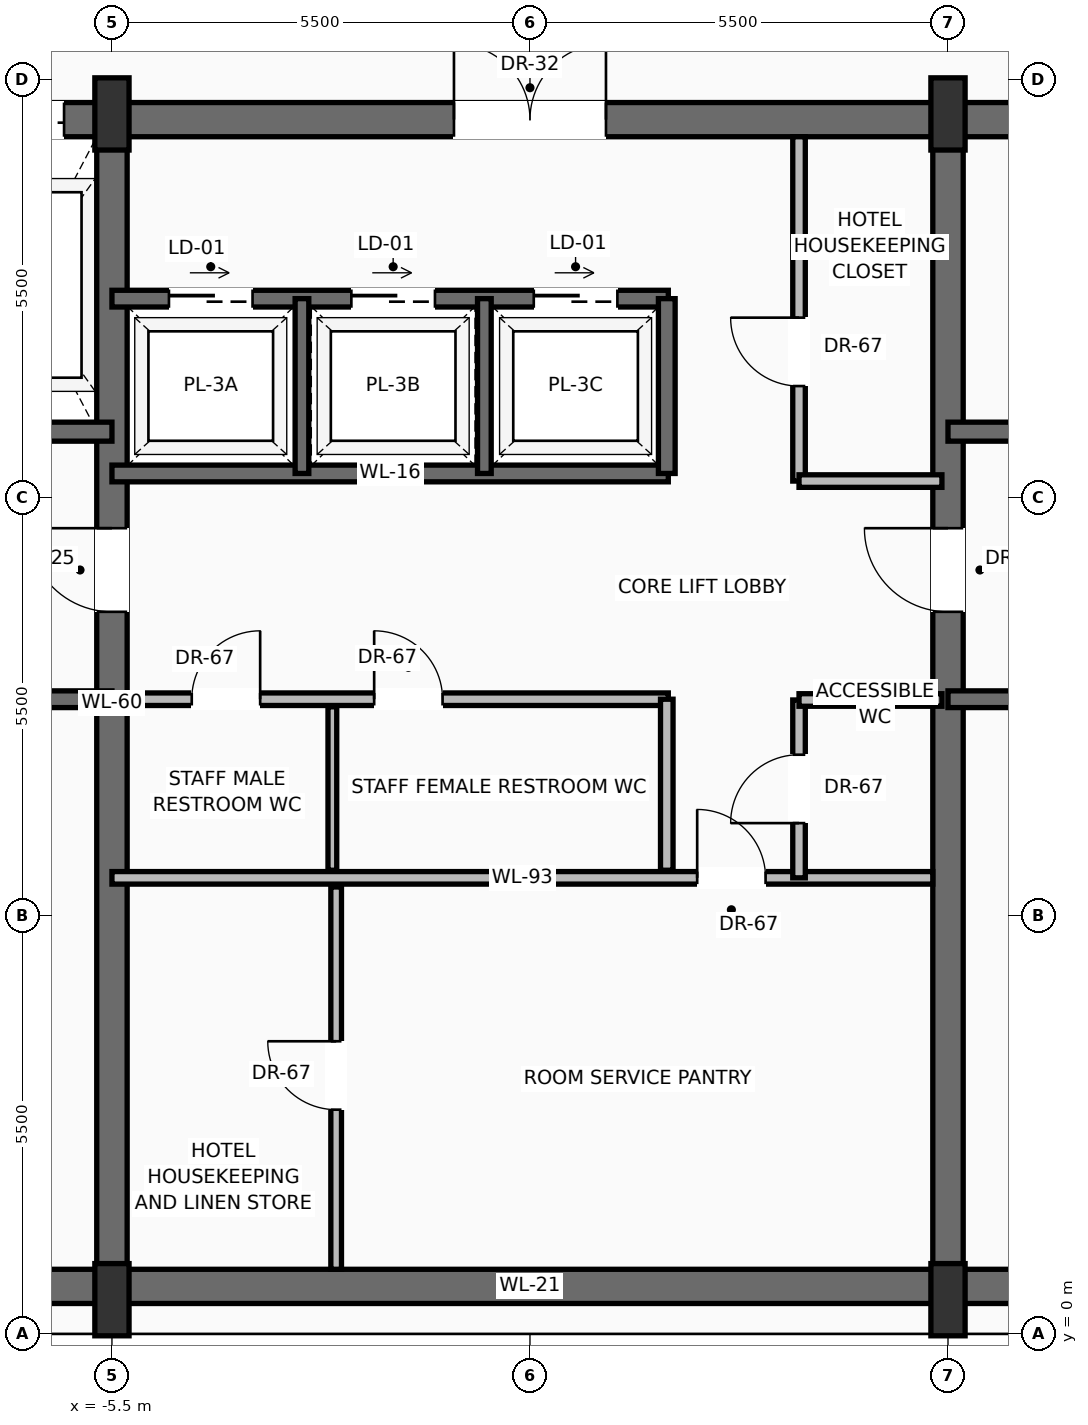
"""IFC4 building model, lengths in metres.
Left out: names, types, materials, properties, quantities, classifications, styles, units other than length and angle.
Written with IfcOpenShell. Run it as: python <this file> out.ifc"""

import sys

from ifc_helpers import new_model, si_unit, direction, frame, frame_2d, origin, origin_2d, place, context, subcontext, project, spatial, rectangle, extrude, source, transform, mapped, element, fill, save


model = new_model("IFC4")
c1 = context("Model", 3, precision=1e-05, world=origin(), true_north=direction((0.0, 1.0)))
c2 = subcontext(c1, "Body", "Model", "MODEL_VIEW")
j1 = project(units=[si_unit("LENGTHUNIT", "METRE"), si_unit("PLANEANGLEUNIT", "RADIAN")], contexts=[c1])
p1 = place(None, origin())
s1 = spatial("IfcSite", under=j1, at=p1, CompositionType="ELEMENT")
p2 = place(p1, origin())
s2 = spatial("IfcBuilding", under=s1, at=p2, CompositionType="ELEMENT")
p3 = place(p2, frame((0.0, 0.0, 276.45)))
s3 = spatial("IfcBuildingStorey", under=s2, at=p3, CompositionType="ELEMENT", Elevation=276.45)
p4 = place(p3, frame((-10.65, 0.625, 0.0), z_axis=(0.0, 0.0, 1.0), x_axis=(1.0, 0.0, 0.0)))
e1 = element("IfcWall", 1, at=p4, inside=s3, PredefinedType="SHEAR", context=c2, shape_type="SweptSolid", body=[
    extrude(rectangle(XDim=21.3, YDim=0.45, at=frame_2d((10.65, 0.0))), origin(), (0.0, 0.0, 1.0), 3.24),
])
p5 = place(p3, frame((-10.6, 15.975, 0.0), z_axis=(0.0, 0.0, 1.0), x_axis=(1.0, 0.0, 0.0)))
e2 = element("IfcWall", 2, at=p5, inside=s3, PredefinedType="SHEAR", context=c2, shape_type="SweptSolid", body=[
    extrude(rectangle(XDim=21.2, YDim=0.45, at=frame_2d((10.6, 0.0))), origin(), (0.0, 0.0, 1.0), 3.24),
])
p6 = place(p5, frame((3.17, 0.0, 0.0)))
e3 = element("IfcOpeningElement", 3, at=p6, cuts=e2, PredefinedType="OPENING", context=c2, shape_type="SweptSolid", body=[
    extrude(rectangle(XDim=1.3, YDim=2.3, at=frame_2d((0.65, 1.15))), frame((0.0, 0.235, 0.0), z_axis=(0.0, -1.0, 0.0), x_axis=(1.0, 0.0, 0.0)), (0.0, 0.0, 1.0), 0.47),
])
p7 = place(p5, frame((9.6, 0.0, 0.0)))
e4 = element("IfcOpeningElement", 4, at=p7, cuts=e2, PredefinedType="OPENING", context=c2, shape_type="SweptSolid", body=[
    extrude(rectangle(XDim=2.0, YDim=2.4, at=frame_2d((1.0, 1.2))), frame((0.0, 0.235, 0.0), z_axis=(0.0, -1.0, 0.0), x_axis=(1.0, 0.0, 0.0)), (0.0, 0.0, 1.0), 0.47),
])
p8 = place(p3, frame((-5.5, 0.625, 0.0), z_axis=(0.0, 0.0, 1.0), x_axis=(0.0, 1.0, 0.0)))
e5 = element("IfcWall", 5, at=p8, inside=s3, PredefinedType="SHEAR", context=c2, shape_type="SweptSolid", body=[
    extrude(rectangle(XDim=15.35, YDim=0.4, at=frame_2d((7.675, 0.0))), origin(), (0.0, 0.0, 1.0), 3.24),
])
p9 = place(p8, frame((8.875, 0.0, 0.0)))
e6 = element("IfcOpeningElement", 6, at=p9, cuts=e5, PredefinedType="OPENING", context=c2, shape_type="SweptSolid", body=[
    extrude(rectangle(XDim=1.1, YDim=2.2, at=frame_2d((0.55, 1.1))), frame((0.0, 0.21, 0.0), z_axis=(0.0, -1.0, 0.0), x_axis=(1.0, 0.0, 0.0)), (0.0, 0.0, 1.0), 0.42),
])
p10 = place(p3, frame((5.5, 0.625, 0.0), z_axis=(0.0, 0.0, 1.0), x_axis=(0.0, 1.0, 0.0)))
e7 = element("IfcWall", 7, at=p10, inside=s3, PredefinedType="SHEAR", context=c2, shape_type="SweptSolid", body=[
    extrude(rectangle(XDim=15.35, YDim=0.4, at=frame_2d((7.675, 0.0))), origin(), (0.0, 0.0, 1.0), 3.24),
])
p11 = place(p10, frame((8.875, 0.0, 0.0)))
e8 = element("IfcOpeningElement", 8, at=p11, cuts=e7, PredefinedType="OPENING", context=c2, shape_type="SweptSolid", body=[
    extrude(rectangle(XDim=1.1, YDim=2.2, at=frame_2d((0.55, 1.1))), frame((0.0, 0.21, 0.0), z_axis=(0.0, -1.0, 0.0), x_axis=(1.0, 0.0, 0.0)), (0.0, 0.0, 1.0), 0.42),
])
m1 = source(origin(), c2, "Body", "SweptSolid", [
    extrude(rectangle(XDim=0.45, YDim=0.95, at=origin_2d()), origin(), (0.0, 0.0, 1.0), 3.45),
])
for number, where, z_axis, x_axis in (
    (9, (-5.5, 0.45, 0.0), (0.0, 0.0, 1.0), (1.0, 0.0, 0.0)),
    (10, (5.5, 0.45, 0.0), (0.0, 0.0, 1.0), (1.0, 0.0, 0.0)),
    (11, (-5.5, 16.05, 0.0), (0.0, 0.0, 1.0), (1.0, 0.0, 0.0)),
    (12, (5.5, 16.05, 0.0), (0.0, 0.0, 1.0), (1.0, 0.0, 0.0)),
):
    element("IfcColumn", number, at=place(p3, frame(where, z_axis=z_axis, x_axis=x_axis)), inside=s3, PredefinedType="PILASTER", context=c2, shape_type="MappedRepresentation", body=[
        mapped(m1, transform((0.0, 0.0, 0.0), scale=1.0)),
    ])
p12 = place(p3, frame((-5.5, 8.35, 0.0), z_axis=(0.0, 0.0, 1.0), x_axis=(-1.0, 0.0, 0.0)))
e13 = element("IfcWall", 13, at=p12, inside=s3, PredefinedType="SOLIDWALL", context=c2, shape_type="SweptSolid", body=[
    extrude(rectangle(XDim=4.65, YDim=0.22, at=frame_2d((2.325, 0.0))), origin(), (0.0, 0.0, 1.0), 3.24),
])
p13 = place(p12, frame((2.5, 0.0, 0.0)))
e14 = element("IfcOpeningElement", 14, at=p13, cuts=e13, PredefinedType="OPENING", context=c2, shape_type="SweptSolid", body=[
    extrude(rectangle(XDim=1.15, YDim=2.2, at=frame_2d((0.575, 1.1))), frame((0.0, 0.12, 0.0), z_axis=(0.0, -1.0, 0.0), x_axis=(1.0, 0.0, 0.0)), (0.0, 0.0, 1.0), 0.24),
])
p14 = place(p3, frame((-5.5, 11.87, 0.0), z_axis=(0.0, 0.0, 1.0), x_axis=(-1.0, 0.0, 0.0)))
e15 = element("IfcWall", 15, at=p14, inside=s3, PredefinedType="SOLIDWALL", context=c2, shape_type="SweptSolid", body=[
    extrude(rectangle(XDim=4.65, YDim=0.25, at=frame_2d((2.325, 0.0))), origin(), (0.0, 0.0, 1.0), 3.24),
])
p15 = place(p14, frame((2.95, 0.0, 0.0)))
e16 = element("IfcOpeningElement", 16, at=p15, cuts=e15, PredefinedType="OPENING", context=c2, shape_type="SweptSolid", body=[
    extrude(rectangle(XDim=1.2, YDim=2.25, at=frame_2d((0.6, 1.125))), frame((0.0, 0.135, 0.0), z_axis=(0.0, -1.0, 0.0), x_axis=(1.0, 0.0, 0.0)), (0.0, 0.0, 1.0), 0.27),
])
p16 = place(p3, frame((10.15, 8.35, 0.0), z_axis=(0.0, 0.0, 1.0), x_axis=(-1.0, 0.0, 0.0)))
e17 = element("IfcWall", 17, at=p16, inside=s3, PredefinedType="SOLIDWALL", context=c2, shape_type="SweptSolid", body=[
    extrude(rectangle(XDim=4.65, YDim=0.22, at=frame_2d((2.325, 0.0))), origin(), (0.0, 0.0, 1.0), 3.24),
])
p17 = place(p16, frame((1.0, 0.0, 0.0)))
e18 = element("IfcOpeningElement", 18, at=p17, cuts=e17, PredefinedType="OPENING", context=c2, shape_type="SweptSolid", body=[
    extrude(rectangle(XDim=1.15, YDim=2.2, at=frame_2d((0.575, 1.1))), frame((0.0, 0.12, 0.0), z_axis=(0.0, -1.0, 0.0), x_axis=(1.0, 0.0, 0.0)), (0.0, 0.0, 1.0), 0.24),
])
p18 = place(p3, frame((10.15, 11.87, 0.0), z_axis=(0.0, 0.0, 1.0), x_axis=(-1.0, 0.0, 0.0)))
e19 = element("IfcWall", 19, at=p18, inside=s3, PredefinedType="SOLIDWALL", context=c2, shape_type="SweptSolid", body=[
    extrude(rectangle(XDim=4.65, YDim=0.25, at=frame_2d((2.325, 0.0))), origin(), (0.0, 0.0, 1.0), 3.24),
])
p19 = place(p18, frame((0.5, 0.0, 0.0)))
e20 = element("IfcOpeningElement", 20, at=p19, cuts=e19, PredefinedType="OPENING", context=c2, shape_type="SweptSolid", body=[
    extrude(rectangle(XDim=1.2, YDim=2.25, at=frame_2d((0.6, 1.125))), frame((0.0, 0.135, 0.0), z_axis=(0.0, -1.0, 0.0), x_axis=(1.0, 0.0, 0.0)), (0.0, 0.0, 1.0), 0.27),
])
p20 = place(p3, frame((-5.5, 6.0, 0.0), z_axis=(0.0, 0.0, 1.0), x_axis=(1.0, 0.0, 0.0)))
e21 = element("IfcWall", 21, at=p20, inside=s3, PredefinedType="PARTITIONING", context=c2, shape_type="SweptSolid", body=[
    extrude(rectangle(XDim=10.8, YDim=0.165, at=frame_2d((5.4, 0.0))), origin(), (0.0, 0.0, 1.0), 3.232),
])
p21 = place(p20, frame((7.7, 0.0, 0.0)))
e22 = element("IfcOpeningElement", 22, at=p21, cuts=e21, PredefinedType="OPENING", context=c2, shape_type="SweptSolid", body=[
    extrude(rectangle(XDim=0.9, YDim=2.1, at=frame_2d((0.45, 1.05))), frame((0.0, 0.093, 0.0), z_axis=(0.0, -1.0, 0.0), x_axis=(1.0, 0.0, 0.0)), (0.0, 0.0, 1.0), 0.185),
])
p22 = place(p3, frame((-2.55, 0.85, 0.0), z_axis=(0.0, 0.0, 1.0), x_axis=(0.0, 1.0, 0.0)))
e23 = element("IfcWall", 23, at=p22, inside=s3, PredefinedType="PARTITIONING", context=c2, shape_type="SweptSolid", body=[
    extrude(rectangle(XDim=5.03, YDim=0.14, at=frame_2d((2.515, 0.0))), origin(), (0.0, 0.0, 1.0), 3.232),
])
p23 = place(p22, frame((2.1, 0.0, 0.0)))
e24 = element("IfcOpeningElement", 24, at=p23, cuts=e23, PredefinedType="OPENING", context=c2, shape_type="SweptSolid", body=[
    extrude(rectangle(XDim=0.9, YDim=2.1, at=frame_2d((0.45, 1.05))), frame((0.0, 0.08, 0.0), z_axis=(0.0, -1.0, 0.0), x_axis=(1.0, 0.0, 0.0)), (0.0, 0.0, 1.0), 0.16),
])
p24 = place(p3, frame((3.54, 6.0, 0.0), z_axis=(0.0, 0.0, 1.0), x_axis=(0.0, 1.0, 0.0)))
e25 = element("IfcWall", 25, at=p24, inside=s3, PredefinedType="PARTITIONING", context=c2, shape_type="SweptSolid", body=[
    extrude(rectangle(XDim=2.34, YDim=0.165, at=frame_2d((1.17, 0.0))), origin(), (0.0, 0.0, 1.0), 3.232),
])
p25 = place(p24, frame((0.72, 0.0, 0.0)))
e26 = element("IfcOpeningElement", 26, at=p25, cuts=e25, PredefinedType="OPENING", context=c2, shape_type="SweptSolid", body=[
    extrude(rectangle(XDim=0.9, YDim=2.1, at=frame_2d((0.45, 1.05))), frame((0.0, 0.093, 0.0), z_axis=(0.0, -1.0, 0.0), x_axis=(1.0, 0.0, 0.0)), (0.0, 0.0, 1.0), 0.185),
])
p26 = place(p3, frame((3.54, 8.34, 0.0), z_axis=(0.0, 0.0, 1.0), x_axis=(1.0, 0.0, 0.0)))
e27 = element("IfcWall", 27, at=p26, inside=s3, PredefinedType="PARTITIONING", context=c2, shape_type="SweptSolid", body=[
    extrude(rectangle(XDim=1.88, YDim=0.165, at=frame_2d((0.94, 0.0))), origin(), (0.0, 0.0, 1.0), 3.232),
])
p27 = place(p3, frame((-5.3, 8.35, 0.0), z_axis=(0.0, 0.0, 1.0), x_axis=(1.0, 0.0, 0.0)))
e28 = element("IfcWall", 28, at=p27, inside=s3, PredefinedType="PARTITIONING", context=c2, shape_type="SweptSolid", body=[
    extrude(rectangle(XDim=7.12, YDim=0.165, at=frame_2d((3.56, 0.0))), origin(), (0.0, 0.0, 1.0), 3.232),
])
p28 = place(p27, frame((0.85, 0.0, 0.0)))
e29 = element("IfcOpeningElement", 29, at=p28, cuts=e28, PredefinedType="OPENING", context=c2, shape_type="SweptSolid", body=[
    extrude(rectangle(XDim=0.9, YDim=2.1, at=frame_2d((0.45, 1.05))), frame((0.0, 0.093, 0.0), z_axis=(0.0, -1.0, 0.0), x_axis=(1.0, 0.0, 0.0)), (0.0, 0.0, 1.0), 0.185),
])
p29 = place(p27, frame((3.25, 0.0, 0.0)))
e30 = element("IfcOpeningElement", 30, at=p29, cuts=e28, PredefinedType="OPENING", context=c2, shape_type="SweptSolid", body=[
    extrude(rectangle(XDim=0.9, YDim=2.1, at=frame_2d((0.45, 1.05))), frame((0.0, 0.093, 0.0), z_axis=(0.0, -1.0, 0.0), x_axis=(1.0, 0.0, 0.0)), (0.0, 0.0, 1.0), 0.185),
])
p30 = place(p3, frame((1.8, 6.1, 0.0), z_axis=(0.0, 0.0, 1.0), x_axis=(0.0, 1.0, 0.0)))
e31 = element("IfcWall", 31, at=p30, inside=s3, PredefinedType="PARTITIONING", context=c2, shape_type="SweptSolid", body=[
    extrude(rectangle(XDim=2.25, YDim=0.165, at=frame_2d((1.125, 0.0))), origin(), (0.0, 0.0, 1.0), 3.232),
])
p31 = place(p3, frame((-2.6, 6.1, 0.0), z_axis=(0.0, 0.0, 1.0), x_axis=(0.0, 1.0, 0.0)))
e32 = element("IfcWall", 32, at=p31, inside=s3, PredefinedType="PARTITIONING", context=c2, shape_type="SweptSolid", body=[
    extrude(rectangle(XDim=2.15, YDim=0.115, at=frame_2d((1.075, 0.0))), origin(), (0.0, 0.0, 1.0), 3.232),
])
p32 = place(p3, frame((-5.5, 11.32, 0.0), z_axis=(0.0, 0.0, 1.0), x_axis=(1.0, 0.0, 0.0)))
e33 = element("IfcWall", 33, at=p32, inside=s3, PredefinedType="SOLIDWALL", context=c2, shape_type="SweptSolid", body=[
    extrude(rectangle(XDim=7.32, YDim=0.22, at=frame_2d((3.66, 0.0))), origin(), (0.0, 0.0, 1.0), 3.24),
])
p33 = place(p3, frame((-5.5, 13.62, 0.0), z_axis=(0.0, 0.0, 1.0), x_axis=(1.0, 0.0, 0.0)))
e34 = element("IfcWall", 34, at=p33, inside=s3, PredefinedType="SOLIDWALL", context=c2, shape_type="SweptSolid", body=[
    extrude(rectangle(XDim=7.32, YDim=0.22, at=frame_2d((3.66, 0.0))), origin(), (0.0, 0.0, 1.0), 3.24),
])
p34 = place(p33, frame((0.75, 0.0, 0.0)))
e35 = element("IfcOpeningElement", 35, at=p34, cuts=e34, PredefinedType="OPENING", context=c2, shape_type="SweptSolid", body=[
    extrude(rectangle(XDim=1.1, YDim=2.2, at=frame_2d((0.55, 1.1))), frame((0.0, 0.12, 0.0), z_axis=(0.0, -1.0, 0.0), x_axis=(1.0, 0.0, 0.0)), (0.0, 0.0, 1.0), 0.24),
])
p35 = place(p33, frame((3.15, 0.0, 0.0)))
e36 = element("IfcOpeningElement", 36, at=p35, cuts=e34, PredefinedType="OPENING", context=c2, shape_type="SweptSolid", body=[
    extrude(rectangle(XDim=1.1, YDim=2.2, at=frame_2d((0.55, 1.1))), frame((0.0, 0.12, 0.0), z_axis=(0.0, -1.0, 0.0), x_axis=(1.0, 0.0, 0.0)), (0.0, 0.0, 1.0), 0.24),
])
p36 = place(p33, frame((5.55, 0.0, 0.0)))
e37 = element("IfcOpeningElement", 37, at=p36, cuts=e34, PredefinedType="OPENING", context=c2, shape_type="SweptSolid", body=[
    extrude(rectangle(XDim=1.1, YDim=2.2, at=frame_2d((0.55, 1.1))), frame((0.0, 0.12, 0.0), z_axis=(0.0, -1.0, 0.0), x_axis=(1.0, 0.0, 0.0)), (0.0, 0.0, 1.0), 0.24),
])
p37 = place(p3, frame((1.8, 11.32, 0.0), z_axis=(0.0, 0.0, 1.0), x_axis=(0.0, 1.0, 0.0)))
e38 = element("IfcWall", 38, at=p37, inside=s3, PredefinedType="SOLIDWALL", context=c2, shape_type="SweptSolid", body=[
    extrude(rectangle(XDim=2.3, YDim=0.22, at=frame_2d((1.15, 0.0))), origin(), (0.0, 0.0, 1.0), 3.24),
])
for number, where, z_axis, x_axis in (
    (39, (-3.0, 11.32, 0.0), (0.0, 0.0, 1.0), (0.0, 1.0, 0.0)),
    (40, (-0.6, 11.32, 0.0), (0.0, 0.0, 1.0), (0.0, 1.0, 0.0)),
):
    element("IfcWall", number, at=place(p3, frame(where, z_axis=z_axis, x_axis=x_axis)), inside=s3, PredefinedType="SOLIDWALL", context=c2, shape_type="SweptSolid", body=[
        extrude(rectangle(XDim=2.3, YDim=0.18, at=frame_2d((1.15, 0.0))), origin(), (0.0, 0.0, 1.0), 3.24),
    ])
p38 = place(p3, frame((3.54, 11.22, 0.0), z_axis=(0.0, 0.0, 1.0), x_axis=(0.0, 1.0, 0.0)))
e41 = element("IfcWall", 41, at=p38, inside=s3, PredefinedType="PARTITIONING", context=c2, shape_type="SweptSolid", body=[
    extrude(rectangle(XDim=4.53, YDim=0.165, at=frame_2d((2.265, 0.0))), origin(), (0.0, 0.0, 1.0), 3.232),
])
p39 = place(p38, frame((1.25, 0.0, 0.0)))
e42 = element("IfcOpeningElement", 42, at=p39, cuts=e41, PredefinedType="OPENING", context=c2, shape_type="SweptSolid", body=[
    extrude(rectangle(XDim=0.9, YDim=2.1, at=frame_2d((0.45, 1.05))), frame((0.0, 0.093, 0.0), z_axis=(0.0, -1.0, 0.0), x_axis=(1.0, 0.0, 0.0)), (0.0, 0.0, 1.0), 0.185),
])
p40 = place(p3, frame((3.54, 11.22, 0.0), z_axis=(0.0, 0.0, 1.0), x_axis=(1.0, 0.0, 0.0)))
e43 = element("IfcWall", 43, at=p40, inside=s3, PredefinedType="PARTITIONING", context=c2, shape_type="SweptSolid", body=[
    extrude(rectangle(XDim=1.88, YDim=0.165, at=frame_2d((0.94, 0.0))), origin(), (0.0, 0.0, 1.0), 3.232),
])
m2 = source(origin(), c2, "Body", "SweptSolid", [
    extrude(rectangle(XDim=1.1, YDim=2.2, at=frame_2d((0.55, 1.1))), frame((0.0, 0.025, 0.0), z_axis=(0.0, -1.0, 0.0), x_axis=(1.0, 0.0, 0.0)), (0.0, 0.0, 1.0), 0.05),
])
p41 = place(p9, origin())
e44 = element("IfcDoor", 44, at=p41, inside=s3, OperationType="SINGLE_SWING_RIGHT", PredefinedType="DOOR", context=c2, shape_type="MappedRepresentation", body=[
    mapped(m2, transform((0.0, 0.0, 0.0), scale=1.0)),
])
fill(e6, e44)
m3 = source(origin(), c2, "Body", "SweptSolid", [
    extrude(rectangle(XDim=1.3, YDim=2.3, at=frame_2d((0.65, 1.15))), frame((0.0, 0.025, 0.0), z_axis=(0.0, -1.0, 0.0), x_axis=(1.0, 0.0, 0.0)), (0.0, 0.0, 1.0), 0.05),
])
p42 = place(p6, origin())
e45 = element("IfcDoor", 45, at=p42, inside=s3, OperationType="SLIDING_TO_RIGHT", PredefinedType="DOOR", context=c2, shape_type="MappedRepresentation", body=[
    mapped(m3, transform((0.0, 0.0, 0.0), scale=1.0)),
])
fill(e3, e45)
p43 = place(p11, origin())
e46 = element("IfcDoor", 46, at=p43, inside=s3, OperationType="SINGLE_SWING_RIGHT", PredefinedType="DOOR", context=c2, shape_type="MappedRepresentation", body=[
    mapped(m2, transform((0.0, 0.0, 0.0), scale=1.0)),
])
fill(e8, e46)
m4 = source(origin(), c2, "Body", "SweptSolid", [
    extrude(rectangle(XDim=2.0, YDim=2.4, at=frame_2d((1.0, 1.2))), frame((0.0, 0.025, 0.0), z_axis=(0.0, -1.0, 0.0), x_axis=(1.0, 0.0, 0.0)), (0.0, 0.0, 1.0), 0.05),
])
p44 = place(p7, origin())
e47 = element("IfcDoor", 47, at=p44, inside=s3, OperationType="DOUBLE_DOOR_SINGLE_SWING", PredefinedType="DOOR", context=c2, shape_type="MappedRepresentation", body=[
    mapped(m4, transform((0.0, 0.0, 0.0), scale=1.0)),
])
fill(e4, e47)
m5 = source(origin(), c2, "Body", "SweptSolid", [
    extrude(rectangle(XDim=0.9, YDim=2.1, at=frame_2d((0.45, 1.05))), frame((0.0, 0.025, 0.0), z_axis=(0.0, -1.0, 0.0), x_axis=(1.0, 0.0, 0.0)), (0.0, 0.0, 1.0), 0.05),
])
p45 = place(p21, origin())
e48 = element("IfcDoor", 48, at=p45, inside=s3, OperationType="SINGLE_SWING_LEFT", PredefinedType="DOOR", context=c2, shape_type="MappedRepresentation", body=[
    mapped(m5, transform((0.0, 0.0, 0.0), scale=1.0)),
])
fill(e22, e48)
p46 = place(p23, origin())
e49 = element("IfcDoor", 49, at=p46, inside=s3, OperationType="SINGLE_SWING_RIGHT", PredefinedType="DOOR", context=c2, shape_type="MappedRepresentation", body=[
    mapped(m5, transform((0.0, 0.0, 0.0), scale=1.0)),
])
fill(e24, e49)
p47 = place(p25, origin())
e50 = element("IfcDoor", 50, at=p47, inside=s3, OperationType="SINGLE_SWING_LEFT", PredefinedType="DOOR", context=c2, shape_type="MappedRepresentation", body=[
    mapped(m5, transform((0.0, 0.0, 0.0), scale=1.0)),
])
fill(e26, e50)
p48 = place(p28, origin())
e51 = element("IfcDoor", 51, at=p48, inside=s3, OperationType="SINGLE_SWING_RIGHT", PredefinedType="DOOR", context=c2, shape_type="MappedRepresentation", body=[
    mapped(m5, transform((0.0, 0.0, 0.0), scale=1.0)),
])
fill(e29, e51)
p49 = place(p29, origin())
e52 = element("IfcDoor", 52, at=p49, inside=s3, OperationType="SINGLE_SWING_LEFT", PredefinedType="DOOR", context=c2, shape_type="MappedRepresentation", body=[
    mapped(m5, transform((0.0, 0.0, 0.0), scale=1.0)),
])
fill(e30, e52)
m6 = source(origin(), c2, "Body", "SweptSolid", [
    extrude(rectangle(XDim=1.1, YDim=2.2, at=frame_2d((0.55, 1.1))), frame((0.0, 0.025, 0.0), z_axis=(0.0, -1.0, 0.0), x_axis=(1.0, 0.0, 0.0)), (0.0, 0.0, 1.0), 0.05),
])
p50 = place(p34, origin())
e53 = element("IfcDoor", 53, at=p50, inside=s3, OperationType="SLIDING_TO_RIGHT", PredefinedType="DOOR", context=c2, shape_type="MappedRepresentation", body=[
    mapped(m6, transform((0.0, 0.0, 0.0), scale=1.0)),
])
fill(e35, e53)
p51 = place(p35, origin())
e54 = element("IfcDoor", 54, at=p51, inside=s3, OperationType="SLIDING_TO_RIGHT", PredefinedType="DOOR", context=c2, shape_type="MappedRepresentation", body=[
    mapped(m6, transform((0.0, 0.0, 0.0), scale=1.0)),
])
fill(e36, e54)
p52 = place(p36, origin())
e55 = element("IfcDoor", 55, at=p52, inside=s3, OperationType="SLIDING_TO_RIGHT", PredefinedType="DOOR", context=c2, shape_type="MappedRepresentation", body=[
    mapped(m6, transform((0.0, 0.0, 0.0), scale=1.0)),
])
fill(e37, e55)
p53 = place(p39, origin())
e56 = element("IfcDoor", 56, at=p53, inside=s3, OperationType="SINGLE_SWING_RIGHT", PredefinedType="DOOR", context=c2, shape_type="MappedRepresentation", body=[
    mapped(m5, transform((0.0, 0.0, 0.0), scale=1.0)),
])
fill(e42, e56)
save(model, sys.argv[1])
